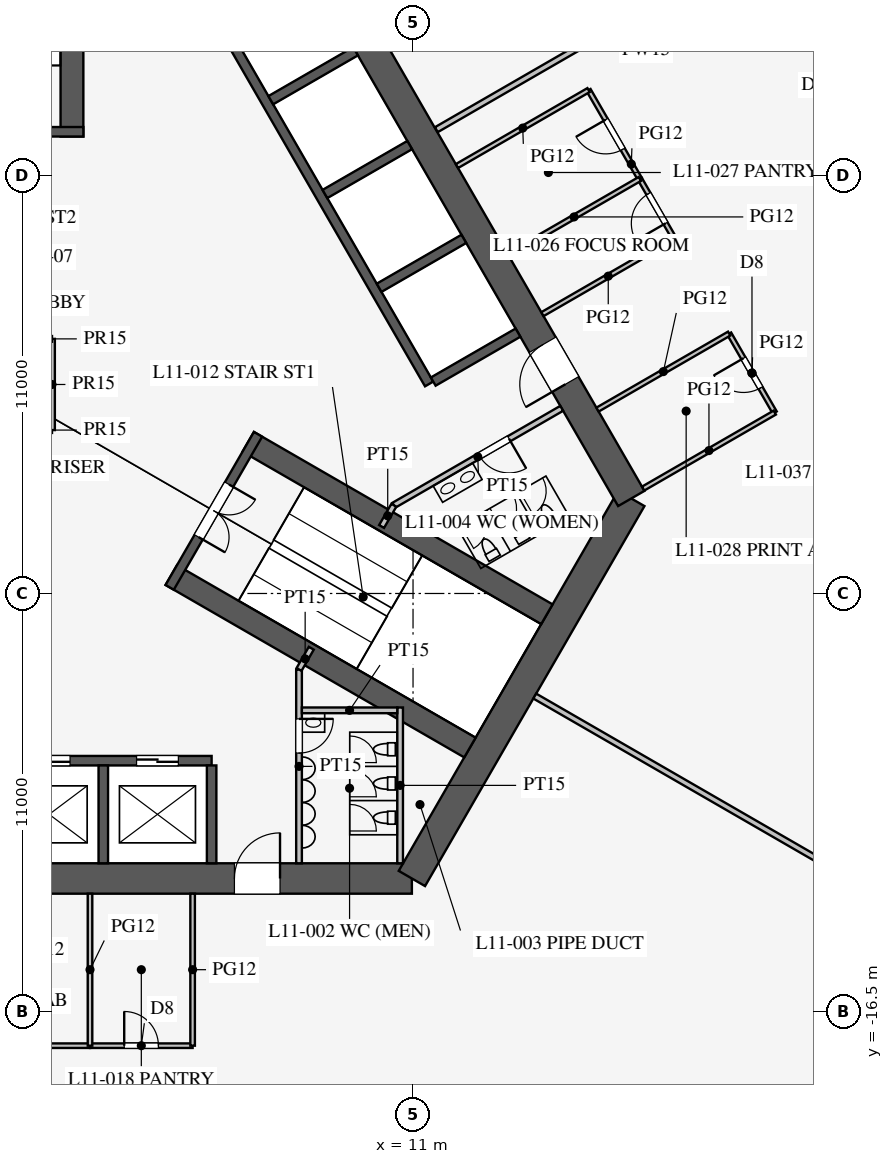
"""IFC4 building model, lengths in metres.
Left out: names, types, materials, properties, quantities, classifications, styles, units other than length and angle.
Written with IfcOpenShell. Run it as: python <this file> out.ifc"""

import sys

from ifc_helpers import new_model, si_unit, direction, frame, frame_2d, origin, place, context, subcontext, project, spatial, rectangle, extrude, element, fill, save


model = new_model("IFC4")
c1 = context("Model", 3, precision=1e-05, world=origin(), true_north=direction((0.0, 1.0)))
c2 = subcontext(c1, "Body", "Model", "MODEL_VIEW")
j1 = project(units=[si_unit("LENGTHUNIT", "METRE"), si_unit("PLANEANGLEUNIT", "RADIAN")], contexts=[c1])
p1 = place(None, origin())
s1 = spatial("IfcSite", under=j1, at=p1, CompositionType="ELEMENT")
p2 = place(p1, origin())
s2 = spatial("IfcBuilding", under=s1, at=p2, CompositionType="ELEMENT")
p3 = place(p2, frame((0.0, 0.0, 50.1)))
s3 = spatial("IfcBuildingStorey", under=s2, at=p3, CompositionType="ELEMENT", Elevation=50.1)
p4 = place(p3, frame((-10.97, -13.0, 0.0), z_axis=(0.0, 0.0, 1.0), x_axis=(1.0, 0.0, 0.0)))
e1 = element("IfcWall", 1, at=p4, inside=s3, PredefinedType="SHEAR", context=c2, shape_type="SweptSolid", body=[
    extrude(rectangle(XDim=21.939, YDim=0.8, at=frame_2d((10.97, 0.0))), origin(), (0.0, 0.0, 1.0), 4.2),
])
p5 = place(p4, frame((17.27, 0.0, 0.0)))
e2 = element("IfcOpeningElement", 2, at=p5, cuts=e1, PredefinedType="OPENING", context=c2, shape_type="SweptSolid", body=[
    extrude(rectangle(XDim=1.2, YDim=2.1, at=frame_2d((0.6, 1.05))), frame((0.0, 0.41, 0.0), z_axis=(0.0, -1.0, 0.0), x_axis=(1.0, 0.0, 0.0)), (0.0, 0.0, 1.0), 0.82),
])
p6 = place(p4, frame((3.47, 0.0, 0.0)))
e3 = element("IfcOpeningElement", 3, at=p6, cuts=e1, PredefinedType="OPENING", context=c2, shape_type="SweptSolid", body=[
    extrude(rectangle(XDim=1.2, YDim=2.1, at=frame_2d((0.6, 1.05))), frame((0.0, 0.41, 0.0), z_axis=(0.0, -1.0, 0.0), x_axis=(1.0, 0.0, 0.0)), (0.0, 0.0, 1.0), 0.82),
])
p7 = place(p3, frame((10.97, -13.0, 0.0), z_axis=(0.0, 0.0, 1.0), x_axis=(0.499995765644, 0.866027848477, 0.0)))
e4 = element("IfcWall", 4, at=p7, inside=s3, PredefinedType="SHEAR", context=c2, shape_type="SweptSolid", body=[
    extrude(rectangle(XDim=11.547, YDim=0.8, at=frame_2d((5.773, 0.0))), origin(), (0.0, 0.0, 1.0), 4.2),
])
p8 = place(p3, frame((16.743, -3.0, 0.0), z_axis=(0.0, 0.0, 1.0), x_axis=(-0.500002442456, 0.866023993627, 0.0)))
e5 = element("IfcWall", 5, at=p8, inside=s3, PredefinedType="SHEAR", context=c2, shape_type="SweptSolid", body=[
    extrude(rectangle(XDim=21.939, YDim=0.8, at=frame_2d((10.97, 0.0))), origin(), (0.0, 0.0, 1.0), 4.2),
])
p9 = place(p8, frame((17.27, 0.0, 0.0)))
e6 = element("IfcOpeningElement", 6, at=p9, cuts=e5, PredefinedType="OPENING", context=c2, shape_type="SweptSolid", body=[
    extrude(rectangle(XDim=1.2, YDim=2.1, at=frame_2d((0.6, 1.05))), frame((0.0, 0.41, 0.0), z_axis=(0.0, -1.0, 0.0), x_axis=(1.0, 0.0, 0.0)), (0.0, 0.0, 1.0), 0.82),
])
p10 = place(p8, frame((3.47, 0.0, 0.0)))
e7 = element("IfcOpeningElement", 7, at=p10, cuts=e5, PredefinedType="OPENING", context=c2, shape_type="SweptSolid", body=[
    extrude(rectangle(XDim=1.2, YDim=2.1, at=frame_2d((0.6, 1.05))), frame((0.0, 0.41, 0.0), z_axis=(0.0, -1.0, 0.0), x_axis=(1.0, 0.0, 0.0)), (0.0, 0.0, 1.0), 0.82),
])
p11 = place(p3, frame((-5.7, -9.9, 0.0), z_axis=(0.0, 0.0, 1.0), x_axis=(1.0, 0.0, 0.0)))
e8 = element("IfcWall", 8, at=p11, inside=s3, PredefinedType="SHEAR", context=c2, shape_type="SweptSolid", body=[
    extrude(rectangle(XDim=11.4, YDim=0.25, at=frame_2d((5.7, 0.0))), origin(), (0.0, 0.0, 1.0), 4.2),
])
p12 = place(p11, frame((0.875, 0.0, 0.0)))
e9 = element("IfcOpeningElement", 9, at=p12, cuts=e8, PredefinedType="OPENING", context=c2, shape_type="SweptSolid", body=[
    extrude(rectangle(XDim=1.1, YDim=2.2, at=frame_2d((0.55, 1.1))), frame((0.0, 0.135, 0.0), z_axis=(0.0, -1.0, 0.0), x_axis=(1.0, 0.0, 0.0)), (0.0, 0.0, 1.0), 0.27),
])
p13 = place(p11, frame((3.725, 0.0, 0.0)))
e10 = element("IfcOpeningElement", 10, at=p13, cuts=e8, PredefinedType="OPENING", context=c2, shape_type="SweptSolid", body=[
    extrude(rectangle(XDim=1.1, YDim=2.2, at=frame_2d((0.55, 1.1))), frame((0.0, 0.135, 0.0), z_axis=(0.0, -1.0, 0.0), x_axis=(1.0, 0.0, 0.0)), (0.0, 0.0, 1.0), 0.27),
])
p14 = place(p11, frame((6.575, 0.0, 0.0)))
e11 = element("IfcOpeningElement", 11, at=p14, cuts=e8, PredefinedType="OPENING", context=c2, shape_type="SweptSolid", body=[
    extrude(rectangle(XDim=1.1, YDim=2.2, at=frame_2d((0.55, 1.1))), frame((0.0, 0.135, 0.0), z_axis=(0.0, -1.0, 0.0), x_axis=(1.0, 0.0, 0.0)), (0.0, 0.0, 1.0), 0.27),
])
p15 = place(p11, frame((9.425, 0.0, 0.0)))
e12 = element("IfcOpeningElement", 12, at=p15, cuts=e8, PredefinedType="OPENING", context=c2, shape_type="SweptSolid", body=[
    extrude(rectangle(XDim=1.1, YDim=2.2, at=frame_2d((0.55, 1.1))), frame((0.0, 0.135, 0.0), z_axis=(0.0, -1.0, 0.0), x_axis=(1.0, 0.0, 0.0)), (0.0, 0.0, 1.0), 0.27),
])
for number, where, z_axis, x_axis in (
    (13, (2.85, -10.025, 0.0), (0.0, 0.0, 1.0), (0.0, -1.0, 0.0)),
    (14, (5.7, -10.025, 0.0), (0.0, 0.0, 1.0), (0.0, -1.0, 0.0)),
):
    element("IfcWall", number, at=place(p3, frame(where, z_axis=z_axis, x_axis=x_axis)), inside=s3, PredefinedType="SHEAR", context=c2, shape_type="SweptSolid", body=[
        extrude(rectangle(XDim=2.575, YDim=0.25, at=frame_2d((1.288, 0.0))), origin(), (0.0, 0.0, 1.0), 4.2),
    ])
p16 = place(p3, frame((11.424, 0.014, 0.0), z_axis=(0.0, 0.0, 1.0), x_axis=(-0.500001763848, 0.866024385424, 0.0)))
e15 = element("IfcWall", 15, at=p16, inside=s3, PredefinedType="SHEAR", context=c2, shape_type="SweptSolid", body=[
    extrude(rectangle(XDim=11.4, YDim=0.25, at=frame_2d((5.7, 0.0))), origin(), (0.0, 0.0, 1.0), 4.2),
])
for number, where, z_axis, x_axis in (
    (16, (11.532, 0.076, 0.0), (0.0, 0.0, 1.0), (0.866, 0.5, 0.0)),
    (17, (10.107, 2.544, 0.0), (0.0, 0.0, 1.0), (0.866, 0.5, 0.0)),
    (18, (8.682, 5.012, 0.0), (0.0, 0.0, 1.0), (0.866, 0.5, 0.0)),
    (19, (7.257, 7.481, 0.0), (0.0, 0.0, 1.0), (0.866, 0.5, 0.0)),
):
    element("IfcWall", number, at=place(p3, frame(where, z_axis=z_axis, x_axis=x_axis)), inside=s3, PredefinedType="SHEAR", context=c2, shape_type="SweptSolid", body=[
        extrude(rectangle(XDim=2.575, YDim=0.25, at=frame_2d((1.288, 0.0))), origin(), (0.0, 0.0, 1.0), 4.2),
    ])
for number, where, z_axis, x_axis in (
    (20, (4.638, -5.016, 0.0), (0.0, 0.0, 1.0), (0.866, -0.5, 0.0)),
    (21, (6.663, -1.509, 0.0), (0.0, 0.0, 1.0), (0.866, -0.5, 0.0)),
):
    element("IfcWall", number, at=place(p3, frame(where, z_axis=z_axis, x_axis=x_axis)), inside=s3, PredefinedType="SHEAR", context=c2, shape_type="SweptSolid", body=[
        extrude(rectangle(XDim=9.075, YDim=0.6, at=frame_2d((4.538, 0.0))), origin(), (0.0, 0.0, 1.0), 4.2),
    ])
p17 = place(p3, frame((4.597, -5.339, 0.0), z_axis=(0.0, 0.0, 1.0), x_axis=(0.499984536904, 0.866034331223, 0.0)))
e22 = element("IfcWall", 22, at=p17, inside=s3, PredefinedType="SHEAR", context=c2, shape_type="SweptSolid", body=[
    extrude(rectangle(XDim=4.65, YDim=0.25, at=frame_2d((2.325, 0.0))), origin(), (0.0, 0.0, 1.0), 4.2),
])
p18 = place(p17, frame((1.525, 0.0, 0.0)))
e23 = element("IfcOpeningElement", 23, at=p18, cuts=e22, PredefinedType="OPENING", context=c2, shape_type="SweptSolid", body=[
    extrude(rectangle(XDim=1.6, YDim=2.1, at=frame_2d((0.8, 1.05))), frame((0.0, 0.135, 0.0), z_axis=(0.0, -1.0, 0.0), x_axis=(1.0, 0.0, 0.0)), (0.0, 0.0, 1.0), 0.27),
])
p19 = place(p3, frame((2.025, 6.525, 0.0), z_axis=(0.0, 0.0, 1.0), x_axis=(0.0, 1.0, 0.0)))
e24 = element("IfcWall", 24, at=p19, inside=s3, PredefinedType="SHEAR", context=c2, shape_type="SweptSolid", body=[
    extrude(rectangle(XDim=9.075, YDim=0.6, at=frame_2d((4.538, 0.0))), origin(), (0.0, 0.0, 1.0), 4.2),
])
p20 = place(p3, frame((2.325, 6.65, 0.0), z_axis=(0.0, 0.0, 1.0), x_axis=(-1.0, 0.0, 0.0)))
e25 = element("IfcWall", 25, at=p20, inside=s3, PredefinedType="SHEAR", context=c2, shape_type="SweptSolid", body=[
    extrude(rectangle(XDim=4.65, YDim=0.25, at=frame_2d((2.325, 0.0))), origin(), (0.0, 0.0, 1.0), 4.2),
])
p21 = place(p20, frame((1.525, 0.0, 0.0)))
e26 = element("IfcOpeningElement", 26, at=p21, cuts=e25, PredefinedType="OPENING", context=c2, shape_type="SweptSolid", body=[
    extrude(rectangle(XDim=1.6, YDim=2.1, at=frame_2d((0.8, 1.05))), frame((0.0, 0.135, 0.0), z_axis=(0.0, -1.0, 0.0), x_axis=(1.0, 0.0, 0.0)), (0.0, 0.0, 1.0), 0.27),
])
p22 = place(p3, frame((8.0, -7.5, 0.0), z_axis=(0.0, 0.0, 1.0), x_axis=(0.0, -1.0, 0.0)))
e27 = element("IfcWall", 27, at=p22, inside=s3, PredefinedType="PARTITIONING", context=c2, shape_type="SweptSolid", body=[
    extrude(rectangle(XDim=5.1, YDim=0.15, at=frame_2d((2.55, 0.0))), origin(), (0.0, 0.0, 1.0), 4.0),
])
p23 = place(p22, frame((1.3, 0.0, 0.0)))
e28 = element("IfcOpeningElement", 28, at=p23, cuts=e27, PredefinedType="OPENING", context=c2, shape_type="SweptSolid", body=[
    extrude(rectangle(XDim=0.9, YDim=2.1, at=frame_2d((0.45, 1.05))), frame((0.0, 0.085, 0.0), z_axis=(0.0, -1.0, 0.0), x_axis=(1.0, 0.0, 0.0)), (0.0, 0.0, 1.0), 0.17),
])
p24 = place(p3, frame((10.495, -3.178, 0.0), z_axis=(0.0, 0.0, 1.0), x_axis=(0.86602216432, 0.500005610874, 0.0)))
e29 = element("IfcWall", 29, at=p24, inside=s3, PredefinedType="PARTITIONING", context=c2, shape_type="SweptSolid", body=[
    extrude(rectangle(XDim=5.1, YDim=0.15, at=frame_2d((2.55, 0.0))), origin(), (0.0, 0.0, 1.0), 4.0),
])
p25 = place(p24, frame((2.6, 0.0, 0.0)))
e30 = element("IfcOpeningElement", 30, at=p25, cuts=e29, PredefinedType="OPENING", context=c2, shape_type="SweptSolid", body=[
    extrude(rectangle(XDim=0.9, YDim=2.1, at=frame_2d((0.45, 1.05))), frame((0.0, 0.085, 0.0), z_axis=(0.0, -1.0, 0.0), x_axis=(1.0, 0.0, 0.0)), (0.0, 0.0, 1.0), 0.17),
])
for number, where, z_axis, x_axis in (
    (31, (8.0, -7.5, 0.0), (0.0, 0.0, 1.0), (0.5, 0.866, 0.0)),
    (32, (10.495, -3.178, 0.0), (0.0, 0.0, 1.0), (-0.5, -0.866, 0.0)),
):
    element("IfcWall", number, at=place(p3, frame(where, z_axis=z_axis, x_axis=x_axis)), inside=s3, PredefinedType="PARTITIONING", context=c2, shape_type="SweptSolid", body=[
        extrude(rectangle(XDim=0.645, YDim=0.15, at=frame_2d((0.323, 0.0))), origin(), (0.0, 0.0, 1.0), 4.0),
    ])
p26 = place(p3, frame((10.66, -8.5, 0.0), z_axis=(0.0, 0.0, 1.0), x_axis=(0.0, -1.0, 0.0)))
e33 = element("IfcWall", 33, at=p26, inside=s3, PredefinedType="PARTITIONING", context=c2, shape_type="SweptSolid", body=[
    extrude(rectangle(XDim=4.1, YDim=0.15, at=frame_2d((2.05, 0.0))), origin(), (0.0, 0.0, 1.0), 4.0),
])
p27 = place(p3, frame((8.075, -8.575, 0.0), z_axis=(0.0, 0.0, 1.0), x_axis=(1.0, 0.0, 0.0)))
e34 = element("IfcWall", 34, at=p27, inside=s3, PredefinedType="PARTITIONING", context=c2, shape_type="SweptSolid", body=[
    extrude(rectangle(XDim=2.51, YDim=0.15, at=frame_2d((1.255, 0.0))), origin(), (0.0, 0.0, 1.0), 4.0),
])
p28 = place(p3, frame((1.5, -1.2, 0.0), z_axis=(0.0, 0.0, 1.0), x_axis=(0.0, 1.0, 0.0)))
e35 = element("IfcWall", 35, at=p28, inside=s3, PredefinedType="PARTITIONING", context=c2, shape_type="SweptSolid", body=[
    extrude(rectangle(XDim=2.4, YDim=0.15, at=frame_2d((1.2, 0.0))), origin(), (0.0, 0.0, 1.0), 4.0),
])
p29 = place(p3, frame((14.203, -8.2, 0.0), z_axis=(0.0, 0.0, 1.0), x_axis=(0.866024965723, -0.500000758745, 0.0)))
e36 = element("IfcWall", 36, at=p29, inside=s3, PredefinedType="PARTITIONING", context=c2, shape_type="SweptSolid", body=[
    extrude(rectangle(XDim=18.25, YDim=0.15, at=frame_2d((9.125, 0.0))), origin(), (0.0, 0.0, 1.0), 2.3),
])
p30 = place(p3, frame((2.5, -17.4, 0.0), z_axis=(0.0, 0.0, 1.0), x_axis=(1.0, 0.0, 0.0)))
e37 = element("IfcWall", 37, at=p30, inside=s3, PredefinedType="PARTITIONING", context=c2, shape_type="SweptSolid", body=[
    extrude(rectangle(XDim=2.7, YDim=0.12, at=frame_2d((1.35, 0.0))), origin(), (0.0, 0.0, 1.0), 2.9),
])
p31 = place(p30, frame((0.9, 0.0, 0.15)))
e38 = element("IfcOpeningElement", 38, at=p31, cuts=e37, PredefinedType="OPENING", context=c2, shape_type="SweptSolid", body=[
    extrude(rectangle(XDim=0.9, YDim=2.1, at=frame_2d((0.45, 1.05))), frame((0.0, 0.07, 0.0), z_axis=(0.0, -1.0, 0.0), x_axis=(1.0, 0.0, 0.0)), (0.0, 0.0, 1.0), 0.14),
])
p32 = place(p3, frame((-1.1, -17.4, 0.0), z_axis=(0.0, 0.0, 1.0), x_axis=(1.0, 0.0, 0.0)))
e39 = element("IfcWall", 39, at=p32, inside=s3, PredefinedType="PARTITIONING", context=c2, shape_type="SweptSolid", body=[
    extrude(rectangle(XDim=3.6, YDim=0.12, at=frame_2d((1.8, 0.0))), origin(), (0.0, 0.0, 1.0), 2.9),
])
p33 = place(p32, frame((1.3, 0.0, 0.15)))
e40 = element("IfcOpeningElement", 40, at=p33, cuts=e39, PredefinedType="OPENING", context=c2, shape_type="SweptSolid", body=[
    extrude(rectangle(XDim=1.0, YDim=2.1, at=frame_2d((0.5, 1.05))), frame((0.0, 0.07, 0.0), z_axis=(0.0, -1.0, 0.0), x_axis=(1.0, 0.0, 0.0)), (0.0, 0.0, 1.0), 0.14),
])
for number, where, z_axis, x_axis in (
    (41, (2.5, -13.4, 0.0), (0.0, 0.0, 1.0), (0.0, -1.0, 0.0)),
    (42, (5.2, -13.4, 0.0), (0.0, 0.0, 1.0), (0.0, -1.0, 0.0)),
):
    element("IfcWall", number, at=place(p3, frame(where, z_axis=z_axis, x_axis=x_axis)), inside=s3, PredefinedType="PARTITIONING", context=c2, shape_type="SweptSolid", body=[
        extrude(rectangle(XDim=4.0, YDim=0.12, at=frame_2d((2.0, 0.0))), origin(), (0.0, 0.0, 1.0), 2.9),
    ])
p34 = place(p3, frame((11.613, 6.705, 0.0), z_axis=(0.0, 0.0, 1.0), x_axis=(0.86602785495, 0.499995754432, 0.0)))
e43 = element("IfcWall", 43, at=p34, inside=s3, PredefinedType="PARTITIONING", context=c2, shape_type="SweptSolid", body=[
    extrude(rectangle(XDim=12.759, YDim=0.15, at=frame_2d((6.379, 0.0))), origin(), (0.0, 0.0, 1.0), 3.2),
])
p35 = place(p3, frame((20.519, -0.74, 0.0), z_axis=(0.0, 0.0, 1.0), x_axis=(-0.499957262057, 0.866050077142, 0.0)))
e44 = element("IfcWall", 44, at=p35, inside=s3, PredefinedType="PARTITIONING", context=c2, shape_type="SweptSolid", body=[
    extrude(rectangle(XDim=2.4, YDim=0.12, at=frame_2d((1.2, 0.0))), origin(), (0.0, 0.0, 1.0), 2.9),
])
p36 = place(p35, frame((0.75, 0.0, 0.15)))
e45 = element("IfcOpeningElement", 45, at=p36, cuts=e44, PredefinedType="OPENING", context=c2, shape_type="SweptSolid", body=[
    extrude(rectangle(XDim=0.9, YDim=2.1, at=frame_2d((0.45, 1.05))), frame((0.0, 0.07, 0.0), z_axis=(0.0, -1.0, 0.0), x_axis=(1.0, 0.0, 0.0)), (0.0, 0.0, 1.0), 0.14),
])
p37 = place(p3, frame((16.969, 5.409, 0.0), z_axis=(0.0, 0.0, 1.0), x_axis=(-0.499980770555, 0.866036505625, 0.0)))
e46 = element("IfcWall", 46, at=p37, inside=s3, PredefinedType="PARTITIONING", context=c2, shape_type="SweptSolid", body=[
    extrude(rectangle(XDim=2.7, YDim=0.12, at=frame_2d((1.35, 0.0))), origin(), (0.0, 0.0, 1.0), 2.9),
])
p38 = place(p37, frame((0.9, 0.0, 0.15)))
e47 = element("IfcOpeningElement", 47, at=p38, cuts=e46, PredefinedType="OPENING", context=c2, shape_type="SweptSolid", body=[
    extrude(rectangle(XDim=0.9, YDim=2.1, at=frame_2d((0.45, 1.05))), frame((0.0, 0.07, 0.0), z_axis=(0.0, -1.0, 0.0), x_axis=(1.0, 0.0, 0.0)), (0.0, 0.0, 1.0), 0.14),
])
p39 = place(p3, frame((17.869, 3.85, 0.0), z_axis=(0.0, 0.0, 1.0), x_axis=(-0.500062916607, 0.865989075817, 0.0)))
e48 = element("IfcWall", 48, at=p39, inside=s3, PredefinedType="PARTITIONING", context=c2, shape_type="SweptSolid", body=[
    extrude(rectangle(XDim=1.8, YDim=0.12, at=frame_2d((0.9, 0.0))), origin(), (0.0, 0.0, 1.0), 2.9),
])
p40 = place(p39, frame((0.45, 0.0, 0.15)))
e49 = element("IfcOpeningElement", 49, at=p40, cuts=e48, PredefinedType="OPENING", context=c2, shape_type="SweptSolid", body=[
    extrude(rectangle(XDim=0.9, YDim=2.1, at=frame_2d((0.45, 1.05))), frame((0.0, 0.07, 0.0), z_axis=(0.0, -1.0, 0.0), x_axis=(1.0, 0.0, 0.0)), (0.0, 0.0, 1.0), 0.14),
])
for number, where, z_axis, x_axis in (
    (50, (12.155, 5.747, 0.0), (0.0, 0.0, 1.0), (0.866, 0.5, 0.0)),
    (51, (17.055, -2.74, 0.0), (0.0, 0.0, 1.0), (0.866, 0.5, 0.0)),
    (52, (13.505, 3.409, 0.0), (0.0, 0.0, 1.0), (0.866, 0.5, 0.0)),
    (53, (14.405, 1.85, 0.0), (0.0, 0.0, 1.0), (0.866, 0.5, 0.0)),
    (54, (15.855, -0.661, 0.0), (0.0, 0.0, 1.0), (0.866, 0.5, 0.0)),
):
    element("IfcWall", number, at=place(p3, frame(where, z_axis=z_axis, x_axis=x_axis)), inside=s3, PredefinedType="PARTITIONING", context=c2, shape_type="SweptSolid", body=[
        extrude(rectangle(XDim=4.0, YDim=0.12, at=frame_2d((2.0, 0.0))), origin(), (0.0, 0.0, 1.0), 2.9),
    ])
p41 = place(p3, frame((22.544, 7.82, 0.0), z_axis=(0.0, 0.0, 1.0), x_axis=(-0.487373854787, 0.873193406795, 0.0)))
e55 = element("IfcWall", 55, at=p41, inside=s3, PredefinedType="PARTITIONING", context=c2, shape_type="SweptSolid", body=[
    extrude(rectangle(XDim=4.5, YDim=0.12, at=frame_2d((2.25, 0.0))), origin(), (0.0, 0.0, 1.0), 2.9),
])
p42 = place(p41, frame((1.8, 0.0, 0.15)))
e56 = element("IfcOpeningElement", 56, at=p42, cuts=e55, PredefinedType="OPENING", context=c2, shape_type="SweptSolid", body=[
    extrude(rectangle(XDim=0.9, YDim=2.1, at=frame_2d((0.45, 1.05))), frame((0.0, 0.07, 0.0), z_axis=(0.0, -1.0, 0.0), x_axis=(1.0, 0.0, 0.0)), (0.0, 0.0, 1.0), 0.14),
])
p43 = place(p23, origin())
e57 = element("IfcDoor", 57, at=p43, inside=s3, OperationType="SINGLE_SWING_LEFT", PredefinedType="DOOR", context=c2, shape_type="SweptSolid", body=[
    extrude(rectangle(XDim=0.9, YDim=2.1, at=frame_2d((0.45, 1.05))), frame((0.0, 0.025, 0.0), z_axis=(0.0, -1.0, 0.0), x_axis=(1.0, 0.0, 0.0)), (0.0, 0.0, 1.0), 0.05),
])
fill(e28, e57)
p44 = place(p25, frame((0.9, 0.0, 0.0), z_axis=(0.0, 0.0, 1.0), x_axis=(-1.0, 0.0, 0.0)))
e58 = element("IfcDoor", 58, at=p44, inside=s3, OperationType="SINGLE_SWING_LEFT", PredefinedType="DOOR", context=c2, shape_type="SweptSolid", body=[
    extrude(rectangle(XDim=0.9, YDim=2.1, at=frame_2d((0.45, 1.05))), frame((0.0, 0.025, 0.0), z_axis=(0.0, -1.0, 0.0), x_axis=(1.0, 0.0, 0.0)), (0.0, 0.0, 1.0), 0.05),
])
fill(e30, e58)
p45 = place(p18, frame((1.6, 0.0, 0.0), z_axis=(0.0, 0.0, 1.0), x_axis=(-1.0, 0.0, 0.0)))
e59 = element("IfcDoor", 59, at=p45, inside=s3, OperationType="DOUBLE_DOOR_SINGLE_SWING", PredefinedType="DOOR", context=c2, shape_type="SweptSolid", body=[
    extrude(rectangle(XDim=1.6, YDim=2.1, at=frame_2d((0.8, 1.05))), frame((0.0, 0.025, 0.0), z_axis=(0.0, -1.0, 0.0), x_axis=(1.0, 0.0, 0.0)), (0.0, 0.0, 1.0), 0.05),
])
fill(e23, e59)
p46 = place(p5, origin())
e60 = element("IfcDoor", 60, at=p46, inside=s3, OperationType="SINGLE_SWING_RIGHT", PredefinedType="DOOR", context=c2, shape_type="SweptSolid", body=[
    extrude(rectangle(XDim=1.2, YDim=2.1, at=frame_2d((0.6, 1.05))), frame((0.0, 0.025, 0.0), z_axis=(0.0, -1.0, 0.0), x_axis=(1.0, 0.0, 0.0)), (0.0, 0.0, 1.0), 0.05),
])
fill(e2, e60)
p47 = place(p10, origin())
e61 = element("IfcDoor", 61, at=p47, inside=s3, OperationType="SINGLE_SWING_LEFT", PredefinedType="DOOR", context=c2, shape_type="SweptSolid", body=[
    extrude(rectangle(XDim=1.2, YDim=2.1, at=frame_2d((0.6, 1.05))), frame((0.0, 0.025, 0.0), z_axis=(0.0, -1.0, 0.0), x_axis=(1.0, 0.0, 0.0)), (0.0, 0.0, 1.0), 0.05),
])
fill(e7, e61)
p48 = place(p31, origin())
e62 = element("IfcDoor", 62, at=p48, inside=s3, OperationType="SINGLE_SWING_LEFT", PredefinedType="DOOR", context=c2, shape_type="SweptSolid", body=[
    extrude(rectangle(XDim=0.9, YDim=2.1, at=frame_2d((0.45, 1.05))), frame((0.0, 0.025, 0.0), z_axis=(0.0, -1.0, 0.0), x_axis=(1.0, 0.0, 0.0)), (0.0, 0.0, 1.0), 0.05),
])
fill(e38, e62)
p49 = place(p40, origin())
e63 = element("IfcDoor", 63, at=p49, inside=s3, OperationType="SINGLE_SWING_LEFT", PredefinedType="DOOR", context=c2, shape_type="SweptSolid", body=[
    extrude(rectangle(XDim=0.9, YDim=2.1, at=frame_2d((0.45, 1.05))), frame((0.0, 0.025, 0.0), z_axis=(0.0, -1.0, 0.0), x_axis=(1.0, 0.0, 0.0)), (0.0, 0.0, 1.0), 0.05),
])
fill(e49, e63)
p50 = place(p38, origin())
e64 = element("IfcDoor", 64, at=p50, inside=s3, OperationType="SINGLE_SWING_RIGHT", PredefinedType="DOOR", context=c2, shape_type="SweptSolid", body=[
    extrude(rectangle(XDim=0.9, YDim=2.1, at=frame_2d((0.45, 1.05))), frame((0.0, 0.025, 0.0), z_axis=(0.0, -1.0, 0.0), x_axis=(1.0, 0.0, 0.0)), (0.0, 0.0, 1.0), 0.05),
])
fill(e47, e64)
p51 = place(p36, origin())
e65 = element("IfcDoor", 65, at=p51, inside=s3, OperationType="SINGLE_SWING_RIGHT", PredefinedType="DOOR", context=c2, shape_type="SweptSolid", body=[
    extrude(rectangle(XDim=0.9, YDim=2.1, at=frame_2d((0.45, 1.05))), frame((0.0, 0.025, 0.0), z_axis=(0.0, -1.0, 0.0), x_axis=(1.0, 0.0, 0.0)), (0.0, 0.0, 1.0), 0.05),
])
fill(e45, e65)
p52 = place(p14, origin())
e66 = element("IfcDoor", 66, at=p52, inside=s3, OperationType="DOUBLE_DOOR_SLIDING", PredefinedType="DOOR", context=c2, shape_type="SweptSolid", body=[
    extrude(rectangle(XDim=1.1, YDim=2.2, at=frame_2d((0.55, 1.1))), frame((0.0, 0.025, 0.0), z_axis=(0.0, -1.0, 0.0), x_axis=(1.0, 0.0, 0.0)), (0.0, 0.0, 1.0), 0.05),
])
fill(e11, e66)
p53 = place(p15, origin())
e67 = element("IfcDoor", 67, at=p53, inside=s3, OperationType="DOUBLE_DOOR_SLIDING", PredefinedType="DOOR", context=c2, shape_type="SweptSolid", body=[
    extrude(rectangle(XDim=1.1, YDim=2.2, at=frame_2d((0.55, 1.1))), frame((0.0, 0.025, 0.0), z_axis=(0.0, -1.0, 0.0), x_axis=(1.0, 0.0, 0.0)), (0.0, 0.0, 1.0), 0.05),
])
fill(e12, e67)
save(model, sys.argv[1])
